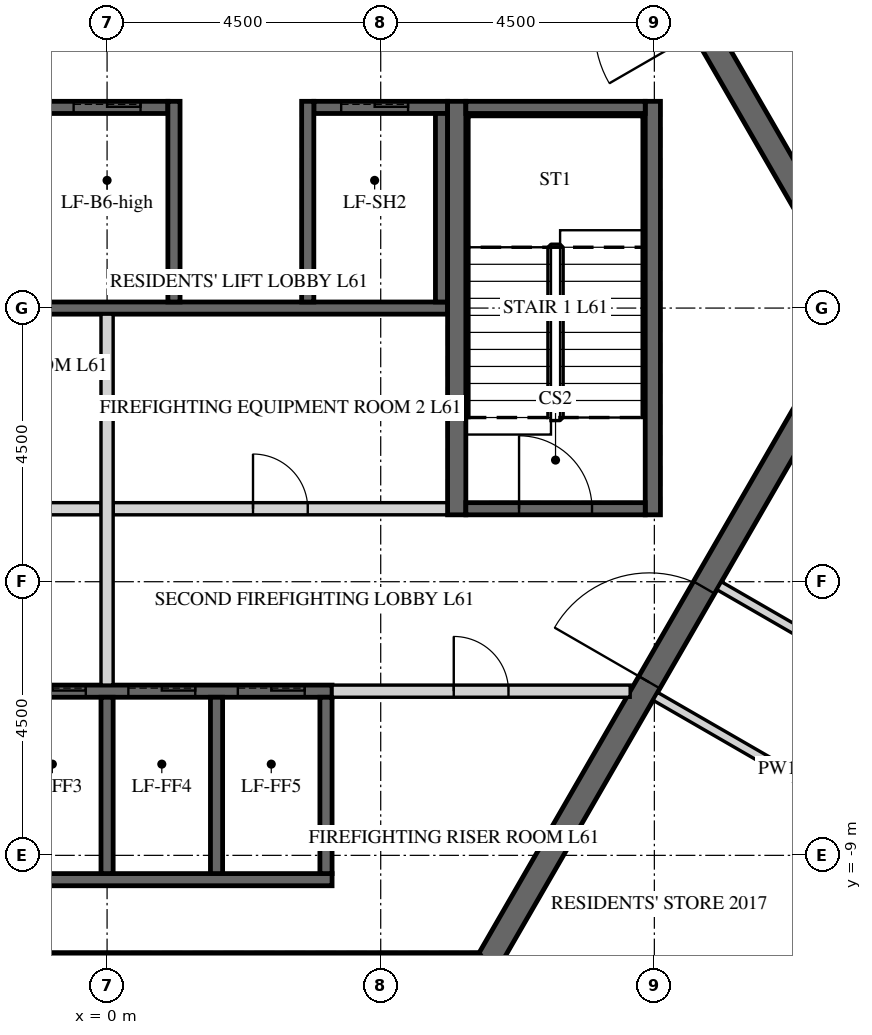
"""IFC4 building model, lengths in metres.
Left out: names, types, materials, properties, quantities, classifications, styles, units other than length and angle.
Written with IfcOpenShell. Run it as: python <this file> out.ifc"""

import sys

from ifc_helpers import new_model, si_unit, direction, frame, frame_2d, origin, place, context, subcontext, project, spatial, polyline, rectangle, outline, extrude, element, fill, save


model = new_model("IFC4")
c1 = context("Model", 3, precision=1e-05, world=origin(), true_north=direction((0.0, 1.0)))
c2 = subcontext(c1, "Body", "Model", "MODEL_VIEW")
j1 = project(units=[si_unit("LENGTHUNIT", "METRE"), si_unit("PLANEANGLEUNIT", "RADIAN")], contexts=[c1])
p1 = place(None, origin())
s1 = spatial("IfcSite", under=j1, at=p1, CompositionType="ELEMENT")
p2 = place(p1, origin())
s2 = spatial("IfcBuilding", under=s1, at=p2, CompositionType="ELEMENT")
p3 = place(p2, frame((0.0, 0.0, 256.2)))
s3 = spatial("IfcBuildingStorey", under=s2, at=p3, CompositionType="ELEMENT", Elevation=256.2)
p4 = place(p3, frame((-6.235, -10.8, 0.0), z_axis=(0.0, 0.0, 1.0), x_axis=(1.0, 0.0, 0.0)))
e1 = element("IfcWall", 1, at=p4, inside=s3, PredefinedType="SHEAR", context=c2, shape_type="SweptSolid", body=[
    extrude(outline(polyline([(-0.115, -0.2), (12.586, -0.2), (12.355, 0.2), (0.115, 0.2), (-0.115, -0.2)])), origin(), (0.0, 0.0, 1.0), 3.75),
])
p5 = place(p3, frame((6.235, -10.8, 0.0), z_axis=(0.0, 0.0, 1.0), x_axis=(0.499996419489, 0.866027470984, 0.0)))
e2 = element("IfcWall", 2, at=p5, inside=s3, PredefinedType="SHEAR", context=c2, shape_type="SweptSolid", body=[
    extrude(outline(polyline([(-0.115, -0.2), (12.586, -0.2), (12.355, 0.2), (0.115, 0.2), (-0.115, -0.2)])), origin(), (0.0, 0.0, 1.0), 3.75),
])
p6 = place(p5, frame((5.364, 0.0, 0.0)))
e3 = element("IfcOpeningElement", 3, at=p6, cuts=e2, PredefinedType="OPENING", context=c2, shape_type="SweptSolid", body=[
    extrude(rectangle(XDim=1.8, YDim=2.4, at=frame_2d((0.9, 1.2))), frame((0.0, 0.21, 0.0), z_axis=(0.0, -1.0, 0.0), x_axis=(1.0, 0.0, 0.0)), (0.0, 0.0, 1.0), 0.42),
])
p7 = place(p3, frame((12.471, 0.0, 0.0), z_axis=(0.0, 0.0, 1.0), x_axis=(-0.499996419489, 0.866027470984, 0.0)))
e4 = element("IfcWall", 4, at=p7, inside=s3, PredefinedType="SHEAR", context=c2, shape_type="SweptSolid", body=[
    extrude(outline(polyline([(-0.115, -0.2), (12.586, -0.2), (12.355, 0.2), (0.115, 0.2), (-0.115, -0.2)])), origin(), (0.0, 0.0, 1.0), 3.75),
])
p8 = place(p7, frame((5.306, 0.0, 0.0)))
e5 = element("IfcOpeningElement", 5, at=p8, cuts=e4, PredefinedType="OPENING", context=c2, shape_type="SweptSolid", body=[
    extrude(rectangle(XDim=1.8, YDim=2.4, at=frame_2d((0.9, 1.2))), frame((0.0, 0.21, 0.0), z_axis=(0.0, -1.0, 0.0), x_axis=(1.0, 0.0, 0.0)), (0.0, 0.0, 1.0), 0.42),
])
p9 = place(p3, frame((-5.6, 3.3, -0.5), z_axis=(0.0, 0.0, 1.0), x_axis=(1.0, 0.0, 0.0)))
e6 = element("IfcWall", 6, at=p9, inside=s3, PredefinedType="SHEAR", context=c2, shape_type="SweptSolid", body=[
    extrude(rectangle(XDim=6.6, YDim=0.2, at=frame_2d((3.3, 0.0))), origin(), (0.0, 0.0, 1.0), 4.15),
])
p10 = place(p9, frame((0.65, 0.0, 0.5)))
e7 = element("IfcOpeningElement", 7, at=p10, cuts=e6, PredefinedType="OPENING", context=c2, shape_type="SweptSolid", body=[
    extrude(rectangle(XDim=1.1, YDim=2.1, at=frame_2d((0.55, 1.05))), frame((0.0, 0.11, 0.0), z_axis=(0.0, -1.0, 0.0), x_axis=(1.0, 0.0, 0.0)), (0.0, 0.0, 1.0), 0.22),
])
p11 = place(p9, frame((2.85, 0.0, 0.5)))
e8 = element("IfcOpeningElement", 8, at=p11, cuts=e6, PredefinedType="OPENING", context=c2, shape_type="SweptSolid", body=[
    extrude(rectangle(XDim=1.1, YDim=2.1, at=frame_2d((0.55, 1.05))), frame((0.0, 0.11, 0.0), z_axis=(0.0, -1.0, 0.0), x_axis=(1.0, 0.0, 0.0)), (0.0, 0.0, 1.0), 0.22),
])
p12 = place(p9, frame((5.05, 0.0, 0.5)))
e9 = element("IfcOpeningElement", 9, at=p12, cuts=e6, PredefinedType="OPENING", context=c2, shape_type="SweptSolid", body=[
    extrude(rectangle(XDim=1.1, YDim=2.1, at=frame_2d((0.55, 1.05))), frame((0.0, 0.11, 0.0), z_axis=(0.0, -1.0, 0.0), x_axis=(1.0, 0.0, 0.0)), (0.0, 0.0, 1.0), 0.22),
])
p13 = place(p3, frame((3.4, 3.3, -0.5), z_axis=(0.0, 0.0, 1.0), x_axis=(1.0, 0.0, 0.0)))
e10 = element("IfcWall", 10, at=p13, inside=s3, PredefinedType="SHEAR", context=c2, shape_type="SweptSolid", body=[
    extrude(rectangle(XDim=2.2, YDim=0.2, at=frame_2d((1.1, 0.0))), origin(), (0.0, 0.0, 1.0), 4.15),
])
p14 = place(p13, frame((0.45, 0.0, 0.5)))
e11 = element("IfcOpeningElement", 11, at=p14, cuts=e10, PredefinedType="OPENING", context=c2, shape_type="SweptSolid", body=[
    extrude(rectangle(XDim=1.1, YDim=2.1, at=frame_2d((0.55, 1.05))), frame((0.0, 0.11, 0.0), z_axis=(0.0, -1.0, 0.0), x_axis=(1.0, 0.0, 0.0)), (0.0, 0.0, 1.0), 0.22),
])
p15 = place(p3, frame((-5.6, 0.0, -0.5), z_axis=(0.0, 0.0, 1.0), x_axis=(1.0, 0.0, 0.0)))
e12 = element("IfcWall", 12, at=p15, inside=s3, PredefinedType="SHEAR", context=c2, shape_type="SweptSolid", body=[
    extrude(rectangle(XDim=11.2, YDim=0.2, at=frame_2d((5.6, 0.0))), origin(), (0.0, 0.0, 1.0), 4.15),
])
for number, where, z_axis, x_axis in (
    (13, (1.1, 0.1, -0.5), (0.0, 0.0, 1.0), (0.0, 1.0, 0.0)),
    (14, (3.3, 0.1, -0.5), (0.0, 0.0, 1.0), (0.0, 1.0, 0.0)),
):
    element("IfcWall", number, at=place(p3, frame(where, z_axis=z_axis, x_axis=x_axis)), inside=s3, PredefinedType="SHEAR", context=c2, shape_type="SweptSolid", body=[
        extrude(rectangle(XDim=3.3, YDim=0.2, at=frame_2d((1.65, 0.0))), origin(), (0.0, 0.0, 1.0), 4.15),
    ])
p16 = place(p3, frame((5.5, 0.1, -0.5), z_axis=(0.0, 0.0, 1.0), x_axis=(0.0, 1.0, 0.0)))
e15 = element("IfcWall", 15, at=p16, inside=s3, PredefinedType="SHEAR", context=c2, shape_type="SweptSolid", body=[
    extrude(rectangle(XDim=3.1, YDim=0.2, at=frame_2d((1.55, 0.0))), origin(), (0.0, 0.0, 1.0), 4.15),
])
p17 = place(p3, frame((-5.5, -6.3, -0.5), z_axis=(0.0, 0.0, 1.0), x_axis=(1.0, 0.0, 0.0)))
e16 = element("IfcWall", 16, at=p17, inside=s3, PredefinedType="SHEAR", context=c2, shape_type="SweptSolid", body=[
    extrude(rectangle(XDim=9.2, YDim=0.2, at=frame_2d((4.6, 0.0))), origin(), (0.0, 0.0, 1.0), 4.15),
])
p18 = place(p17, frame((0.45, 0.0, 0.5)))
e17 = element("IfcOpeningElement", 17, at=p18, cuts=e16, PredefinedType="OPENING", context=c2, shape_type="SweptSolid", body=[
    extrude(rectangle(XDim=1.1, YDim=2.1, at=frame_2d((0.55, 1.05))), frame((0.0, 0.11, 0.0), z_axis=(0.0, -1.0, 0.0), x_axis=(1.0, 0.0, 0.0)), (0.0, 0.0, 1.0), 0.22),
])
p19 = place(p17, frame((2.25, 0.0, 0.5)))
e18 = element("IfcOpeningElement", 18, at=p19, cuts=e16, PredefinedType="OPENING", context=c2, shape_type="SweptSolid", body=[
    extrude(rectangle(XDim=1.1, YDim=2.1, at=frame_2d((0.55, 1.05))), frame((0.0, 0.11, 0.0), z_axis=(0.0, -1.0, 0.0), x_axis=(1.0, 0.0, 0.0)), (0.0, 0.0, 1.0), 0.22),
])
p20 = place(p17, frame((4.05, 0.0, 0.5)))
e19 = element("IfcOpeningElement", 19, at=p20, cuts=e16, PredefinedType="OPENING", context=c2, shape_type="SweptSolid", body=[
    extrude(rectangle(XDim=1.1, YDim=2.1, at=frame_2d((0.55, 1.05))), frame((0.0, 0.11, 0.0), z_axis=(0.0, -1.0, 0.0), x_axis=(1.0, 0.0, 0.0)), (0.0, 0.0, 1.0), 0.22),
])
p21 = place(p17, frame((5.85, 0.0, 0.5)))
e20 = element("IfcOpeningElement", 20, at=p21, cuts=e16, PredefinedType="OPENING", context=c2, shape_type="SweptSolid", body=[
    extrude(rectangle(XDim=1.1, YDim=2.1, at=frame_2d((0.55, 1.05))), frame((0.0, 0.11, 0.0), z_axis=(0.0, -1.0, 0.0), x_axis=(1.0, 0.0, 0.0)), (0.0, 0.0, 1.0), 0.22),
])
p22 = place(p17, frame((7.65, 0.0, 0.5)))
e21 = element("IfcOpeningElement", 21, at=p22, cuts=e16, PredefinedType="OPENING", context=c2, shape_type="SweptSolid", body=[
    extrude(rectangle(XDim=1.1, YDim=2.1, at=frame_2d((0.55, 1.05))), frame((0.0, 0.11, 0.0), z_axis=(0.0, -1.0, 0.0), x_axis=(1.0, 0.0, 0.0)), (0.0, 0.0, 1.0), 0.22),
])
p23 = place(p3, frame((-5.5, -9.4, -0.5), z_axis=(0.0, 0.0, 1.0), x_axis=(1.0, 0.0, 0.0)))
e22 = element("IfcWall", 22, at=p23, inside=s3, PredefinedType="SHEAR", context=c2, shape_type="SweptSolid", body=[
    extrude(rectangle(XDim=9.2, YDim=0.2, at=frame_2d((4.6, 0.0))), origin(), (0.0, 0.0, 1.0), 4.15),
])
for number, where, z_axis, x_axis in (
    (23, (0.0, -9.3, -0.5), (0.0, 0.0, 1.0), (0.0, 1.0, 0.0)),
    (24, (1.8, -9.3, -0.5), (0.0, 0.0, 1.0), (0.0, 1.0, 0.0)),
    (25, (3.6, -9.3, -0.5), (0.0, 0.0, 1.0), (0.0, 1.0, 0.0)),
):
    element("IfcWall", number, at=place(p3, frame(where, z_axis=z_axis, x_axis=x_axis)), inside=s3, PredefinedType="SHEAR", context=c2, shape_type="SweptSolid", body=[
        extrude(rectangle(XDim=2.9, YDim=0.2, at=frame_2d((1.45, 0.0))), origin(), (0.0, 0.0, 1.0), 4.15),
    ])
p24 = place(p3, frame((-5.6, -3.3, 0.0), z_axis=(0.0, 0.0, 1.0), x_axis=(1.0, 0.0, 0.0)))
e26 = element("IfcWall", 26, at=p24, inside=s3, PredefinedType="PARTITIONING", context=c2, shape_type="SweptSolid", body=[
    extrude(rectangle(XDim=5.5, YDim=0.2, at=frame_2d((2.75, 0.0))), origin(), (0.0, 0.0, 1.0), 3.65),
])
p25 = place(p24, frame((2.3, 0.0, 0.0)))
e27 = element("IfcOpeningElement", 27, at=p25, cuts=e26, PredefinedType="OPENING", context=c2, shape_type="SweptSolid", body=[
    extrude(rectangle(XDim=0.9, YDim=2.1, at=frame_2d((0.45, 1.05))), frame((0.0, 0.11, 0.0), z_axis=(0.0, -1.0, 0.0), x_axis=(1.0, 0.0, 0.0)), (0.0, 0.0, 1.0), 0.22),
])
p26 = place(p3, frame((0.1, -3.3, 0.0), z_axis=(0.0, 0.0, 1.0), x_axis=(1.0, 0.0, 0.0)))
e28 = element("IfcWall", 28, at=p26, inside=s3, PredefinedType="PARTITIONING", context=c2, shape_type="SweptSolid", body=[
    extrude(rectangle(XDim=5.5, YDim=0.2, at=frame_2d((2.75, 0.0))), origin(), (0.0, 0.0, 1.0), 3.65),
])
p27 = place(p26, frame((2.3, 0.0, 0.0)))
e29 = element("IfcOpeningElement", 29, at=p27, cuts=e28, PredefinedType="OPENING", context=c2, shape_type="SweptSolid", body=[
    extrude(rectangle(XDim=0.9, YDim=2.1, at=frame_2d((0.45, 1.05))), frame((0.0, 0.11, 0.0), z_axis=(0.0, -1.0, 0.0), x_axis=(1.0, 0.0, 0.0)), (0.0, 0.0, 1.0), 0.22),
])
p28 = place(p3, frame((0.0, -6.2, 0.0), z_axis=(0.0, 0.0, 1.0), x_axis=(0.0, 1.0, 0.0)))
e30 = element("IfcWall", 30, at=p28, inside=s3, PredefinedType="PARTITIONING", context=c2, shape_type="SweptSolid", body=[
    extrude(rectangle(XDim=6.1, YDim=0.2, at=frame_2d((3.05, 0.0))), origin(), (0.0, 0.0, 1.0), 3.65),
])
p29 = place(p3, frame((3.7, -6.3, 0.0), z_axis=(0.0, 0.0, 1.0), x_axis=(1.0, 0.0, 0.0)))
e31 = element("IfcWall", 31, at=p29, inside=s3, PredefinedType="PARTITIONING", context=c2, shape_type="SweptSolid", body=[
    extrude(rectangle(XDim=4.903, YDim=0.2, at=frame_2d((2.451, 0.0))), origin(), (0.0, 0.0, 1.0), 3.65),
])
p30 = place(p29, frame((2.001, 0.0, 0.0)))
e32 = element("IfcOpeningElement", 32, at=p30, cuts=e31, PredefinedType="OPENING", context=c2, shape_type="SweptSolid", body=[
    extrude(rectangle(XDim=0.9, YDim=2.1, at=frame_2d((0.45, 1.05))), frame((0.0, 0.11, 0.0), z_axis=(0.0, -1.0, 0.0), x_axis=(1.0, 0.0, 0.0)), (0.0, 0.0, 1.0), 0.22),
])
p31 = place(p3, frame((5.75, -3.4, -0.5), z_axis=(0.0, 0.0, 1.0), x_axis=(0.0, 1.0, 0.0)))
e33 = element("IfcWall", 33, at=p31, inside=s3, PredefinedType="SHEAR", context=c2, shape_type="SweptSolid", body=[
    extrude(rectangle(XDim=6.8, YDim=0.3, at=frame_2d((3.4, 0.0))), origin(), (0.0, 0.0, 1.0), 4.15),
])
p32 = place(p3, frame((8.975, -3.4, -0.5), z_axis=(0.0, 0.0, 1.0), x_axis=(0.0, 1.0, 0.0)))
e34 = element("IfcWall", 34, at=p32, inside=s3, PredefinedType="SHEAR", context=c2, shape_type="SweptSolid", body=[
    extrude(rectangle(XDim=6.8, YDim=0.25, at=frame_2d((3.4, 0.0))), origin(), (0.0, 0.0, 1.0), 4.15),
])
p33 = place(p3, frame((5.9, 3.3, -0.5), z_axis=(0.0, 0.0, 1.0), x_axis=(1.0, 0.0, 0.0)))
e35 = element("IfcWall", 35, at=p33, inside=s3, PredefinedType="SHEAR", context=c2, shape_type="SweptSolid", body=[
    extrude(rectangle(XDim=2.95, YDim=0.2, at=frame_2d((1.475, 0.0))), origin(), (0.0, 0.0, 1.0), 4.15),
])
p34 = place(p3, frame((5.9, -3.3, -0.5), z_axis=(0.0, 0.0, 1.0), x_axis=(1.0, 0.0, 0.0)))
e36 = element("IfcWall", 36, at=p34, inside=s3, PredefinedType="SHEAR", context=c2, shape_type="SweptSolid", body=[
    extrude(rectangle(XDim=2.95, YDim=0.2, at=frame_2d((1.475, 0.0))), origin(), (0.0, 0.0, 1.0), 4.15),
])
p35 = place(p34, frame((0.875, 0.0, 0.5)))
e37 = element("IfcOpeningElement", 37, at=p35, cuts=e36, PredefinedType="OPENING", context=c2, shape_type="SweptSolid", body=[
    extrude(rectangle(XDim=1.2, YDim=2.4, at=frame_2d((0.6, 1.2))), frame((0.0, 0.11, 0.0), z_axis=(0.0, -1.0, 0.0), x_axis=(1.0, 0.0, 0.0)), (0.0, 0.0, 1.0), 0.22),
])
p36 = place(p3, frame((19.228, -1.146, 0.0), z_axis=(0.0, 0.0, 1.0), x_axis=(-0.559190017735, 0.829039519001, 0.0)))
e38 = element("IfcWall", 38, at=p36, inside=s3, PredefinedType="PARTITIONING", context=c2, shape_type="SweptSolid", body=[
    extrude(rectangle(XDim=17.273, YDim=0.15, at=frame_2d((8.637, 0.0))), origin(), (0.0, 0.0, 1.0), 2.823),
])
p37 = place(p36, frame((6.478, 0.0, 0.0)))
e39 = element("IfcOpeningElement", 39, at=p37, cuts=e38, PredefinedType="OPENING", context=c2, shape_type="SweptSolid", body=[
    extrude(rectangle(XDim=1.0, YDim=2.1, at=frame_2d((0.5, 1.05))), frame((0.0, 0.085, 0.0), z_axis=(0.0, -1.0, 0.0), x_axis=(1.0, 0.0, 0.0)), (0.0, 0.0, 1.0), 0.17),
])
p38 = place(p3, frame((14.158, -6.928, 0.0), z_axis=(0.0, 0.0, 1.0), x_axis=(-0.866024684746, 0.500001245408, 0.0)))
e40 = element("IfcWall", 40, at=p38, inside=s3, PredefinedType="PARTITIONING", context=c2, shape_type="SweptSolid", body=[
    extrude(rectangle(XDim=4.725, YDim=0.15, at=frame_2d((2.363, 0.0))), origin(), (0.0, 0.0, 1.0), 2.823),
])
p39 = place(p3, frame((9.016, -6.384, 0.0), z_axis=(0.0, 0.0, 1.0), x_axis=(0.866015339567, -0.500017431331, 0.0)))
e41 = element("IfcWall", 41, at=p39, inside=s3, PredefinedType="PARTITIONING", context=c2, shape_type="SweptSolid", body=[
    extrude(rectangle(XDim=4.8, YDim=0.15, at=frame_2d((2.4, 0.0))), origin(), (0.0, 0.0, 1.0), 2.823),
])
p40 = place(p3, frame((13.135, -8.849, 0.0), z_axis=(0.0, 0.0, 1.0), x_axis=(-0.500024829938, -0.866011067739, 0.0)))
e42 = element("IfcWall", 42, at=p40, inside=s3, PredefinedType="PARTITIONING", context=c2, shape_type="SweptSolid", body=[
    extrude(rectangle(XDim=4.892, YDim=0.15, at=frame_2d((2.446, 0.0))), origin(), (0.0, 0.0, 1.0), 2.823),
])
p41 = place(p40, frame((1.996, 0.0, 0.0)))
e43 = element("IfcOpeningElement", 43, at=p41, cuts=e42, PredefinedType="OPENING", context=c2, shape_type="SweptSolid", body=[
    extrude(rectangle(XDim=0.9, YDim=2.1, at=frame_2d((0.45, 1.05))), frame((0.0, 0.085, 0.0), z_axis=(0.0, -1.0, 0.0), x_axis=(1.0, 0.0, 0.0)), (0.0, 0.0, 1.0), 0.17),
])
p42 = place(p6, origin())
e44 = element("IfcDoor", 44, at=p42, inside=s3, OperationType="DOUBLE_DOOR_SINGLE_SWING", PredefinedType="DOOR", context=c2, shape_type="SweptSolid", body=[
    extrude(rectangle(XDim=1.8, YDim=2.4, at=frame_2d((0.9, 1.2))), frame((0.0, 0.025, 0.0), z_axis=(0.0, -1.0, 0.0), x_axis=(1.0, 0.0, 0.0)), (0.0, 0.0, 1.0), 0.05),
])
fill(e3, e44)
p43 = place(p27, origin())
e45 = element("IfcDoor", 45, at=p43, inside=s3, OperationType="SINGLE_SWING_LEFT", PredefinedType="DOOR", context=c2, shape_type="SweptSolid", body=[
    extrude(rectangle(XDim=0.9, YDim=2.1, at=frame_2d((0.45, 1.05))), frame((0.0, 0.025, 0.0), z_axis=(0.0, -1.0, 0.0), x_axis=(1.0, 0.0, 0.0)), (0.0, 0.0, 1.0), 0.05),
])
fill(e29, e45)
p44 = place(p30, origin())
e46 = element("IfcDoor", 46, at=p44, inside=s3, OperationType="SINGLE_SWING_LEFT", PredefinedType="DOOR", context=c2, shape_type="SweptSolid", body=[
    extrude(rectangle(XDim=0.9, YDim=2.1, at=frame_2d((0.45, 1.05))), frame((0.0, 0.025, 0.0), z_axis=(0.0, -1.0, 0.0), x_axis=(1.0, 0.0, 0.0)), (0.0, 0.0, 1.0), 0.05),
])
fill(e32, e46)
p45 = place(p35, origin())
e47 = element("IfcDoor", 47, at=p45, inside=s3, OperationType="SINGLE_SWING_LEFT", PredefinedType="DOOR", context=c2, shape_type="SweptSolid", body=[
    extrude(rectangle(XDim=1.2, YDim=2.4, at=frame_2d((0.6, 1.2))), frame((0.0, 0.025, 0.0), z_axis=(0.0, -1.0, 0.0), x_axis=(1.0, 0.0, 0.0)), (0.0, 0.0, 1.0), 0.05),
])
fill(e37, e47)
p46 = place(p12, origin())
e48 = element("IfcDoor", 48, at=p46, inside=s3, OperationType="SLIDING_TO_LEFT", PredefinedType="DOOR", context=c2, shape_type="SweptSolid", body=[
    extrude(rectangle(XDim=1.1, YDim=2.1, at=frame_2d((0.55, 1.05))), frame((0.0, 0.025, 0.0), z_axis=(0.0, -1.0, 0.0), x_axis=(1.0, 0.0, 0.0)), (0.0, 0.0, 1.0), 0.05),
])
fill(e9, e48)
p47 = place(p14, origin())
e49 = element("IfcDoor", 49, at=p47, inside=s3, OperationType="SLIDING_TO_LEFT", PredefinedType="DOOR", context=c2, shape_type="SweptSolid", body=[
    extrude(rectangle(XDim=1.1, YDim=2.1, at=frame_2d((0.55, 1.05))), frame((0.0, 0.025, 0.0), z_axis=(0.0, -1.0, 0.0), x_axis=(1.0, 0.0, 0.0)), (0.0, 0.0, 1.0), 0.05),
])
fill(e11, e49)
p48 = place(p20, origin())
e50 = element("IfcDoor", 50, at=p48, inside=s3, OperationType="SLIDING_TO_LEFT", PredefinedType="DOOR", context=c2, shape_type="SweptSolid", body=[
    extrude(rectangle(XDim=1.1, YDim=2.1, at=frame_2d((0.55, 1.05))), frame((0.0, 0.025, 0.0), z_axis=(0.0, -1.0, 0.0), x_axis=(1.0, 0.0, 0.0)), (0.0, 0.0, 1.0), 0.05),
])
fill(e19, e50)
p49 = place(p21, origin())
e51 = element("IfcDoor", 51, at=p49, inside=s3, OperationType="SLIDING_TO_LEFT", PredefinedType="DOOR", context=c2, shape_type="SweptSolid", body=[
    extrude(rectangle(XDim=1.1, YDim=2.1, at=frame_2d((0.55, 1.05))), frame((0.0, 0.025, 0.0), z_axis=(0.0, -1.0, 0.0), x_axis=(1.0, 0.0, 0.0)), (0.0, 0.0, 1.0), 0.05),
])
fill(e20, e51)
p50 = place(p22, origin())
e52 = element("IfcDoor", 52, at=p50, inside=s3, OperationType="SLIDING_TO_LEFT", PredefinedType="DOOR", context=c2, shape_type="SweptSolid", body=[
    extrude(rectangle(XDim=1.1, YDim=2.1, at=frame_2d((0.55, 1.05))), frame((0.0, 0.025, 0.0), z_axis=(0.0, -1.0, 0.0), x_axis=(1.0, 0.0, 0.0)), (0.0, 0.0, 1.0), 0.05),
])
fill(e21, e52)
save(model, sys.argv[1])
